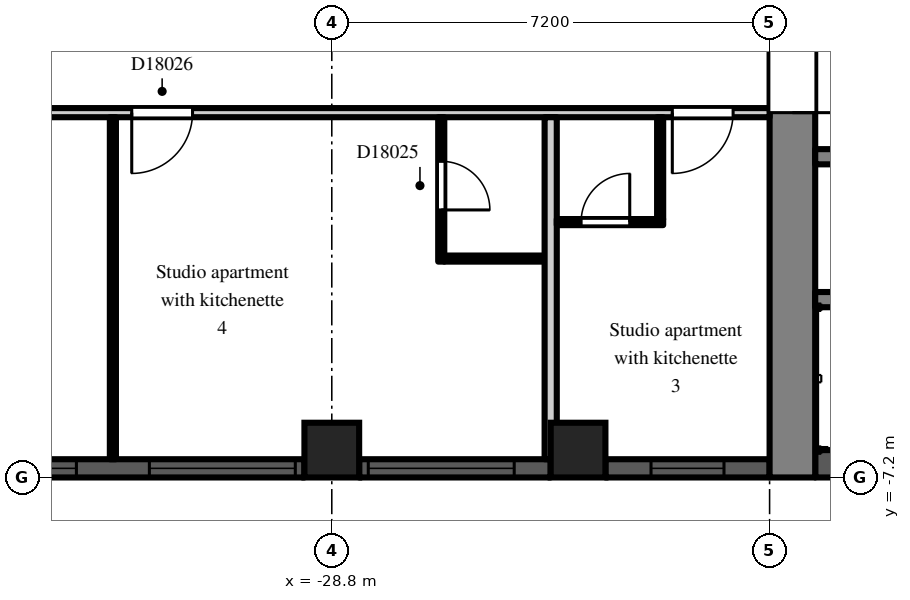
"""IFC4 building model, lengths in metres.
Left out: names, types, materials, properties, quantities, classifications, styles, units other than length and angle.
Written with IfcOpenShell. Run it as: python <this file> out.ifc"""

import sys

from ifc_helpers import new_model, si_unit, direction, frame, frame_2d, origin, origin_2d, place, context, subcontext, project, spatial, rectangle, extrude, element, fill, save


model = new_model("IFC4")
c1 = context("Model", 3, precision=1e-05, world=origin(), true_north=direction((0.0, 1.0)))
c2 = subcontext(c1, "Body", "Model", "MODEL_VIEW")
j1 = project(units=[si_unit("LENGTHUNIT", "METRE"), si_unit("PLANEANGLEUNIT", "RADIAN")], contexts=[c1])
p1 = place(None, origin())
s1 = spatial("IfcSite", under=j1, at=p1, CompositionType="ELEMENT")
p2 = place(p1, origin())
s2 = spatial("IfcBuilding", under=s1, at=p2, CompositionType="ELEMENT")
p3 = place(p2, frame((0.0, 0.0, 123.3)))
s3 = spatial("IfcBuildingStorey", under=s2, at=p3, CompositionType="ELEMENT", Elevation=123.3)
for number, where, z_axis, x_axis in (
    (1, (-28.8, -6.75, 0.0), (0.0, 0.0, 1.0), (1.0, 0.0, 0.0)),
    (2, (-24.75, -6.75, 0.0), (0.0, 0.0, 1.0), (1.0, 0.0, 0.0)),
):
    element("IfcColumn", number, at=place(p3, frame(where, z_axis=z_axis, x_axis=x_axis)), inside=s3, PredefinedType="COLUMN", context=c2, shape_type="SweptSolid", body=[
        extrude(rectangle(XDim=0.9, YDim=0.9, at=origin_2d()), origin(), (0.0, 0.0, 1.0), 3.0),
    ])
p4 = place(p3, frame((-35.55, -7.05, 0.0), z_axis=(0.0, 0.0, 1.0), x_axis=(1.0, 0.0, 0.0)))
e3 = element("IfcWall", 3, at=p4, inside=s3, PredefinedType="SOLIDWALL", context=c2, shape_type="SweptSolid", body=[
    extrude(rectangle(XDim=6.3, YDim=0.3, at=frame_2d((3.15, 0.0))), origin(), (0.0, 0.0, 1.0), 2.2),
])
p5 = place(p4, frame((0.15, 0.0, 0.2)))
e4 = element("IfcOpeningElement", 4, at=p5, cuts=e3, PredefinedType="OPENING", context=c2, shape_type="SweptSolid", body=[
    extrude(rectangle(XDim=2.4, YDim=1.85, at=frame_2d((1.2, 0.925))), frame((0.0, 0.16, 0.0), z_axis=(0.0, -1.0, 0.0), x_axis=(1.0, 0.0, 0.0)), (0.0, 0.0, 1.0), 0.32),
])
p6 = place(p4, frame((3.75, 0.0, 0.2)))
e5 = element("IfcOpeningElement", 5, at=p6, cuts=e3, PredefinedType="OPENING", context=c2, shape_type="SweptSolid", body=[
    extrude(rectangle(XDim=2.4, YDim=1.85, at=frame_2d((1.2, 0.925))), frame((0.0, 0.16, 0.0), z_axis=(0.0, -1.0, 0.0), x_axis=(1.0, 0.0, 0.0)), (0.0, 0.0, 1.0), 0.32),
])
p7 = place(p3, frame((-28.35, -7.05, 0.0), z_axis=(0.0, 0.0, 1.0), x_axis=(1.0, 0.0, 0.0)))
e6 = element("IfcWall", 6, at=p7, inside=s3, PredefinedType="SOLIDWALL", context=c2, shape_type="SweptSolid", body=[
    extrude(rectangle(XDim=3.15, YDim=0.3, at=frame_2d((1.575, 0.0))), origin(), (0.0, 0.0, 1.0), 2.2),
])
p8 = place(p7, frame((0.15, 0.0, 0.2)))
e7 = element("IfcOpeningElement", 7, at=p8, cuts=e6, PredefinedType="OPENING", context=c2, shape_type="SweptSolid", body=[
    extrude(rectangle(XDim=2.4, YDim=1.85, at=frame_2d((1.2, 0.925))), frame((0.0, 0.16, 0.0), z_axis=(0.0, -1.0, 0.0), x_axis=(1.0, 0.0, 0.0)), (0.0, 0.0, 1.0), 0.32),
])
p9 = place(p3, frame((-24.3, -7.05, 0.0), z_axis=(0.0, 0.0, 1.0), x_axis=(1.0, 0.0, 0.0)))
e8 = element("IfcWall", 8, at=p9, inside=s3, PredefinedType="SOLIDWALL", context=c2, shape_type="SweptSolid", body=[
    extrude(rectangle(XDim=2.7, YDim=0.3, at=frame_2d((1.35, 0.0))), origin(), (0.0, 0.0, 1.0), 2.2),
])
p10 = place(p9, frame((0.75, 0.0, 0.2)))
e9 = element("IfcOpeningElement", 9, at=p10, cuts=e8, PredefinedType="OPENING", context=c2, shape_type="SweptSolid", body=[
    extrude(rectangle(XDim=1.2, YDim=1.85, at=frame_2d((0.6, 0.925))), frame((0.0, 0.16, 0.0), z_axis=(0.0, -1.0, 0.0), x_axis=(1.0, 0.0, 0.0)), (0.0, 0.0, 1.0), 0.32),
])
p11 = place(p3, frame((-21.225, -7.2, 0.0), z_axis=(0.0, 0.0, 1.0), x_axis=(0.0, 1.0, 0.0)))
e10 = element("IfcWall", 10, at=p11, inside=s3, PredefinedType="SHEAR", context=c2, shape_type="SweptSolid", body=[
    extrude(rectangle(XDim=14.4, YDim=0.75, at=frame_2d((7.2, 0.0))), origin(), (0.0, 0.0, 1.0), 2.6),
])
p12 = place(p11, frame((6.0, 0.0, 0.0)))
e11 = element("IfcOpeningElement", 11, at=p12, cuts=e10, PredefinedType="OPENING", context=c2, shape_type="SweptSolid", body=[
    extrude(rectangle(XDim=2.4, YDim=2.2, at=frame_2d((1.2, 1.1))), frame((0.0, 0.385, 0.0), z_axis=(0.0, -1.0, 0.0), x_axis=(1.0, 0.0, 0.0)), (0.0, 0.0, 1.0), 0.77),
])
p13 = place(p3, frame((-7.9, -6.975, 0.0), z_axis=(0.0, 0.0, 1.0), x_axis=(-1.0, 0.0, 0.0)))
e12 = element("IfcWall", 12, at=p13, inside=s3, PredefinedType="SHEAR", context=c2, shape_type="SweptSolid", body=[
    extrude(rectangle(XDim=12.95, YDim=0.45, at=frame_2d((6.475, 0.0))), origin(), (0.0, 0.0, 1.0), 2.6),
])
p14 = place(p3, frame((-7.9, -1.925, 0.0), z_axis=(0.0, 0.0, 1.0), x_axis=(-1.0, 0.0, 0.0)))
e13 = element("IfcWall", 13, at=p14, inside=s3, PredefinedType="SHEAR", context=c2, shape_type="SweptSolid", body=[
    extrude(rectangle(XDim=12.95, YDim=0.25, at=frame_2d((6.475, 0.0))), origin(), (0.0, 0.0, 1.0), 2.6),
])
p15 = place(p14, frame((0.525, 0.0, 0.0)))
e14 = element("IfcOpeningElement", 14, at=p15, cuts=e13, PredefinedType="OPENING", context=c2, shape_type="SweptSolid", body=[
    extrude(rectangle(XDim=0.9, YDim=2.1, at=frame_2d((0.45, 1.05))), frame((0.0, 0.135, 0.0), z_axis=(0.0, -1.0, 0.0), x_axis=(1.0, 0.0, 0.0)), (0.0, 0.0, 1.0), 0.27),
])
p16 = place(p14, frame((2.625, 0.0, 0.0)))
e15 = element("IfcOpeningElement", 15, at=p16, cuts=e13, PredefinedType="OPENING", context=c2, shape_type="SweptSolid", body=[
    extrude(rectangle(XDim=1.1, YDim=2.1, at=frame_2d((0.55, 1.05))), frame((0.0, 0.135, 0.0), z_axis=(0.0, -1.0, 0.0), x_axis=(1.0, 0.0, 0.0)), (0.0, 0.0, 1.0), 0.27),
])
p17 = place(p14, frame((4.925, 0.0, 0.0)))
e16 = element("IfcOpeningElement", 16, at=p17, cuts=e13, PredefinedType="OPENING", context=c2, shape_type="SweptSolid", body=[
    extrude(rectangle(XDim=0.9, YDim=2.1, at=frame_2d((0.45, 1.05))), frame((0.0, 0.135, 0.0), z_axis=(0.0, -1.0, 0.0), x_axis=(1.0, 0.0, 0.0)), (0.0, 0.0, 1.0), 0.27),
])
p18 = place(p14, frame((8.225, 0.0, 0.0)))
e17 = element("IfcOpeningElement", 17, at=p18, cuts=e13, PredefinedType="OPENING", context=c2, shape_type="SweptSolid", body=[
    extrude(rectangle(XDim=0.9, YDim=2.1, at=frame_2d((0.45, 1.05))), frame((0.0, 0.135, 0.0), z_axis=(0.0, -1.0, 0.0), x_axis=(1.0, 0.0, 0.0)), (0.0, 0.0, 1.0), 0.27),
])
p19 = place(p14, frame((11.525, 0.0, 0.0)))
e18 = element("IfcOpeningElement", 18, at=p19, cuts=e13, PredefinedType="OPENING", context=c2, shape_type="SweptSolid", body=[
    extrude(rectangle(XDim=0.9, YDim=2.1, at=frame_2d((0.45, 1.05))), frame((0.0, 0.135, 0.0), z_axis=(0.0, -1.0, 0.0), x_axis=(1.0, 0.0, 0.0)), (0.0, 0.0, 1.0), 0.27),
])
p20 = place(p3, frame((-12.3, -4.275, 0.0), z_axis=(0.0, 0.0, 1.0), x_axis=(-1.0, 0.0, 0.0)))
e19 = element("IfcWall", 19, at=p20, inside=s3, PredefinedType="SHEAR", context=c2, shape_type="SweptSolid", body=[
    extrude(rectangle(XDim=8.55, YDim=0.25, at=frame_2d((4.275, 0.0))), origin(), (0.0, 0.0, 1.0), 2.6),
])
p21 = place(p3, frame((-36.5, -1.2, 0.0), z_axis=(0.0, 0.0, 1.0), x_axis=(1.0, 0.0, 0.0)))
e20 = element("IfcWall", 20, at=p21, inside=s3, PredefinedType="PARTITIONING", context=c2, shape_type="SweptSolid", body=[
    extrude(rectangle(XDim=14.9, YDim=0.15, at=frame_2d((7.45, 0.0))), origin(), (0.0, 0.0, 1.0), 2.6),
])
p22 = place(p21, frame((13.3, 0.0, 0.0)))
e21 = element("IfcOpeningElement", 21, at=p22, cuts=e20, PredefinedType="OPENING", context=c2, shape_type="SweptSolid", body=[
    extrude(rectangle(XDim=1.0, YDim=2.1, at=frame_2d((0.5, 1.05))), frame((0.0, 0.085, 0.0), z_axis=(0.0, -1.0, 0.0), x_axis=(1.0, 0.0, 0.0)), (0.0, 0.0, 1.0), 0.17),
])
p23 = place(p21, frame((4.41, 0.0, 0.0)))
e22 = element("IfcOpeningElement", 22, at=p23, cuts=e20, PredefinedType="OPENING", context=c2, shape_type="SweptSolid", body=[
    extrude(rectangle(XDim=1.0, YDim=2.1, at=frame_2d((0.5, 1.05))), frame((0.0, 0.085, 0.0), z_axis=(0.0, -1.0, 0.0), x_axis=(1.0, 0.0, 0.0)), (0.0, 0.0, 1.0), 0.17),
])
p24 = place(p21, frame((1.15, 0.0, 0.0)))
e23 = element("IfcOpeningElement", 23, at=p24, cuts=e20, PredefinedType="OPENING", context=c2, shape_type="SweptSolid", body=[
    extrude(rectangle(XDim=1.8, YDim=2.1, at=frame_2d((0.9, 1.05))), frame((0.0, 0.085, 0.0), z_axis=(0.0, -1.0, 0.0), x_axis=(1.0, 0.0, 0.0)), (0.0, 0.0, 1.0), 0.17),
])
p25 = place(p3, frame((-32.4, -6.9, 0.0), z_axis=(0.0, 0.0, 1.0), x_axis=(0.0, 1.0, 0.0)))
e24 = element("IfcWall", 24, at=p25, inside=s3, PredefinedType="PARTITIONING", context=c2, shape_type="SweptSolid", body=[
    extrude(rectangle(XDim=5.625, YDim=0.1, at=frame_2d((2.812, 0.0))), origin(), (0.0, 0.0, 1.0), 2.6),
])
p26 = place(p3, frame((-27.0, -3.65, 0.0), z_axis=(0.0, 0.0, 1.0), x_axis=(0.0, 1.0, 0.0)))
e25 = element("IfcWall", 25, at=p26, inside=s3, PredefinedType="PARTITIONING", context=c2, shape_type="SweptSolid", body=[
    extrude(rectangle(XDim=2.375, YDim=0.1, at=frame_2d((1.188, 0.0))), origin(), (0.0, 0.0, 1.0), 2.6),
])
p27 = place(p26, frame((0.85, 0.0, 0.0)))
e26 = element("IfcOpeningElement", 26, at=p27, cuts=e25, PredefinedType="OPENING", context=c2, shape_type="SweptSolid", body=[
    extrude(rectangle(XDim=0.8, YDim=2.1, at=frame_2d((0.4, 1.05))), frame((0.0, 0.06, 0.0), z_axis=(0.0, -1.0, 0.0), x_axis=(1.0, 0.0, 0.0)), (0.0, 0.0, 1.0), 0.12),
])
p28 = place(p3, frame((-26.95, -3.6, 0.0), z_axis=(0.0, 0.0, 1.0), x_axis=(1.0, 0.0, 0.0)))
e27 = element("IfcWall", 27, at=p28, inside=s3, PredefinedType="PARTITIONING", context=c2, shape_type="SweptSolid", body=[
    extrude(rectangle(XDim=1.65, YDim=0.1, at=frame_2d((0.825, 0.0))), origin(), (0.0, 0.0, 1.0), 2.6),
])
p29 = place(p3, frame((-25.2, -6.9, 0.0), z_axis=(0.0, 0.0, 1.0), x_axis=(0.0, 1.0, 0.0)))
e28 = element("IfcWall", 28, at=p29, inside=s3, PredefinedType="PARTITIONING", context=c2, shape_type="SweptSolid", body=[
    extrude(rectangle(XDim=5.625, YDim=0.2, at=frame_2d((2.812, 0.0))), origin(), (0.0, 0.0, 1.0), 2.6),
])
p30 = place(p3, frame((-25.1, -3.0, 0.0), z_axis=(0.0, 0.0, 1.0), x_axis=(1.0, 0.0, 0.0)))
e29 = element("IfcWall", 29, at=p30, inside=s3, PredefinedType="PARTITIONING", context=c2, shape_type="SweptSolid", body=[
    extrude(rectangle(XDim=1.75, YDim=0.1, at=frame_2d((0.875, 0.0))), origin(), (0.0, 0.0, 1.0), 2.6),
])
p31 = place(p30, frame((0.4, 0.0, 0.0)))
e30 = element("IfcOpeningElement", 30, at=p31, cuts=e29, PredefinedType="OPENING", context=c2, shape_type="SweptSolid", body=[
    extrude(rectangle(XDim=0.8, YDim=2.1, at=frame_2d((0.4, 1.05))), frame((0.0, 0.06, 0.0), z_axis=(0.0, -1.0, 0.0), x_axis=(1.0, 0.0, 0.0)), (0.0, 0.0, 1.0), 0.12),
])
p32 = place(p3, frame((-23.4, -2.95, 0.0), z_axis=(0.0, 0.0, 1.0), x_axis=(0.0, 1.0, 0.0)))
e31 = element("IfcWall", 31, at=p32, inside=s3, PredefinedType="PARTITIONING", context=c2, shape_type="SweptSolid", body=[
    extrude(rectangle(XDim=1.675, YDim=0.1, at=frame_2d((0.837, 0.0))), origin(), (0.0, 0.0, 1.0), 2.6),
])
p33 = place(p5, origin())
e32 = element("IfcWindow", 32, at=p33, inside=s3, PartitioningType="SINGLE_PANEL", PredefinedType="WINDOW", context=c2, shape_type="SweptSolid", body=[
    extrude(rectangle(XDim=2.4, YDim=1.85, at=frame_2d((1.2, 0.925))), frame((0.0, 0.03, 0.0), z_axis=(0.0, -1.0, 0.0), x_axis=(1.0, 0.0, 0.0)), (0.0, 0.0, 1.0), 0.06),
])
fill(e4, e32)
p34 = place(p6, origin())
e33 = element("IfcWindow", 33, at=p34, inside=s3, PartitioningType="SINGLE_PANEL", PredefinedType="WINDOW", context=c2, shape_type="SweptSolid", body=[
    extrude(rectangle(XDim=2.4, YDim=1.85, at=frame_2d((1.2, 0.925))), frame((0.0, 0.03, 0.0), z_axis=(0.0, -1.0, 0.0), x_axis=(1.0, 0.0, 0.0)), (0.0, 0.0, 1.0), 0.06),
])
fill(e5, e33)
p35 = place(p8, origin())
e34 = element("IfcWindow", 34, at=p35, inside=s3, PartitioningType="SINGLE_PANEL", PredefinedType="WINDOW", context=c2, shape_type="SweptSolid", body=[
    extrude(rectangle(XDim=2.4, YDim=1.85, at=frame_2d((1.2, 0.925))), frame((0.0, 0.03, 0.0), z_axis=(0.0, -1.0, 0.0), x_axis=(1.0, 0.0, 0.0)), (0.0, 0.0, 1.0), 0.06),
])
fill(e7, e34)
p36 = place(p10, origin())
e35 = element("IfcWindow", 35, at=p36, inside=s3, PartitioningType="SINGLE_PANEL", PredefinedType="WINDOW", context=c2, shape_type="SweptSolid", body=[
    extrude(rectangle(XDim=1.2, YDim=1.85, at=frame_2d((0.6, 0.925))), frame((0.0, 0.03, 0.0), z_axis=(0.0, -1.0, 0.0), x_axis=(1.0, 0.0, 0.0)), (0.0, 0.0, 1.0), 0.06),
])
fill(e9, e35)
p37 = place(p12, frame((2.4, 0.0, 0.0), z_axis=(0.0, 0.0, 1.0), x_axis=(-1.0, 0.0, 0.0)))
e36 = element("IfcDoor", 36, at=p37, inside=s3, OperationType="DOUBLE_DOOR_DOUBLE_SWING", PredefinedType="DOOR", context=c2, shape_type="SweptSolid", body=[
    extrude(rectangle(XDim=2.4, YDim=2.2, at=frame_2d((1.2, 1.1))), frame((0.0, 0.025, 0.0), z_axis=(0.0, -1.0, 0.0), x_axis=(1.0, 0.0, 0.0)), (0.0, 0.0, 1.0), 0.05),
])
fill(e11, e36)
p38 = place(p31, origin())
e37 = element("IfcDoor", 37, at=p38, inside=s3, OperationType="SINGLE_SWING_RIGHT", PredefinedType="DOOR", context=c2, shape_type="SweptSolid", body=[
    extrude(rectangle(XDim=0.8, YDim=2.1, at=frame_2d((0.4, 1.05))), frame((0.0, 0.025, 0.0), z_axis=(0.0, -1.0, 0.0), x_axis=(1.0, 0.0, 0.0)), (0.0, 0.0, 1.0), 0.05),
])
fill(e30, e37)
p39 = place(p22, frame((1.0, 0.0, 0.0), z_axis=(0.0, 0.0, 1.0), x_axis=(-1.0, 0.0, 0.0)))
e38 = element("IfcDoor", 38, at=p39, inside=s3, OperationType="SINGLE_SWING_RIGHT", PredefinedType="DOOR", context=c2, shape_type="SweptSolid", body=[
    extrude(rectangle(XDim=1.0, YDim=2.1, at=frame_2d((0.5, 1.05))), frame((0.0, 0.025, 0.0), z_axis=(0.0, -1.0, 0.0), x_axis=(1.0, 0.0, 0.0)), (0.0, 0.0, 1.0), 0.05),
])
fill(e21, e38)
p40 = place(p27, frame((0.8, 0.0, 0.0), z_axis=(0.0, 0.0, 1.0), x_axis=(-1.0, 0.0, 0.0)))
e39 = element("IfcDoor", 39, at=p40, inside=s3, OperationType="SINGLE_SWING_RIGHT", PredefinedType="DOOR", context=c2, shape_type="SweptSolid", body=[
    extrude(rectangle(XDim=0.8, YDim=2.1, at=frame_2d((0.4, 1.05))), frame((0.0, 0.025, 0.0), z_axis=(0.0, -1.0, 0.0), x_axis=(1.0, 0.0, 0.0)), (0.0, 0.0, 1.0), 0.05),
])
fill(e26, e39)
p41 = place(p23, frame((1.0, 0.0, 0.0), z_axis=(0.0, 0.0, 1.0), x_axis=(-1.0, 0.0, 0.0)))
e40 = element("IfcDoor", 40, at=p41, inside=s3, OperationType="SINGLE_SWING_RIGHT", PredefinedType="DOOR", context=c2, shape_type="SweptSolid", body=[
    extrude(rectangle(XDim=1.0, YDim=2.1, at=frame_2d((0.5, 1.05))), frame((0.0, 0.025, 0.0), z_axis=(0.0, -1.0, 0.0), x_axis=(1.0, 0.0, 0.0)), (0.0, 0.0, 1.0), 0.05),
])
fill(e22, e40)
save(model, sys.argv[1])
